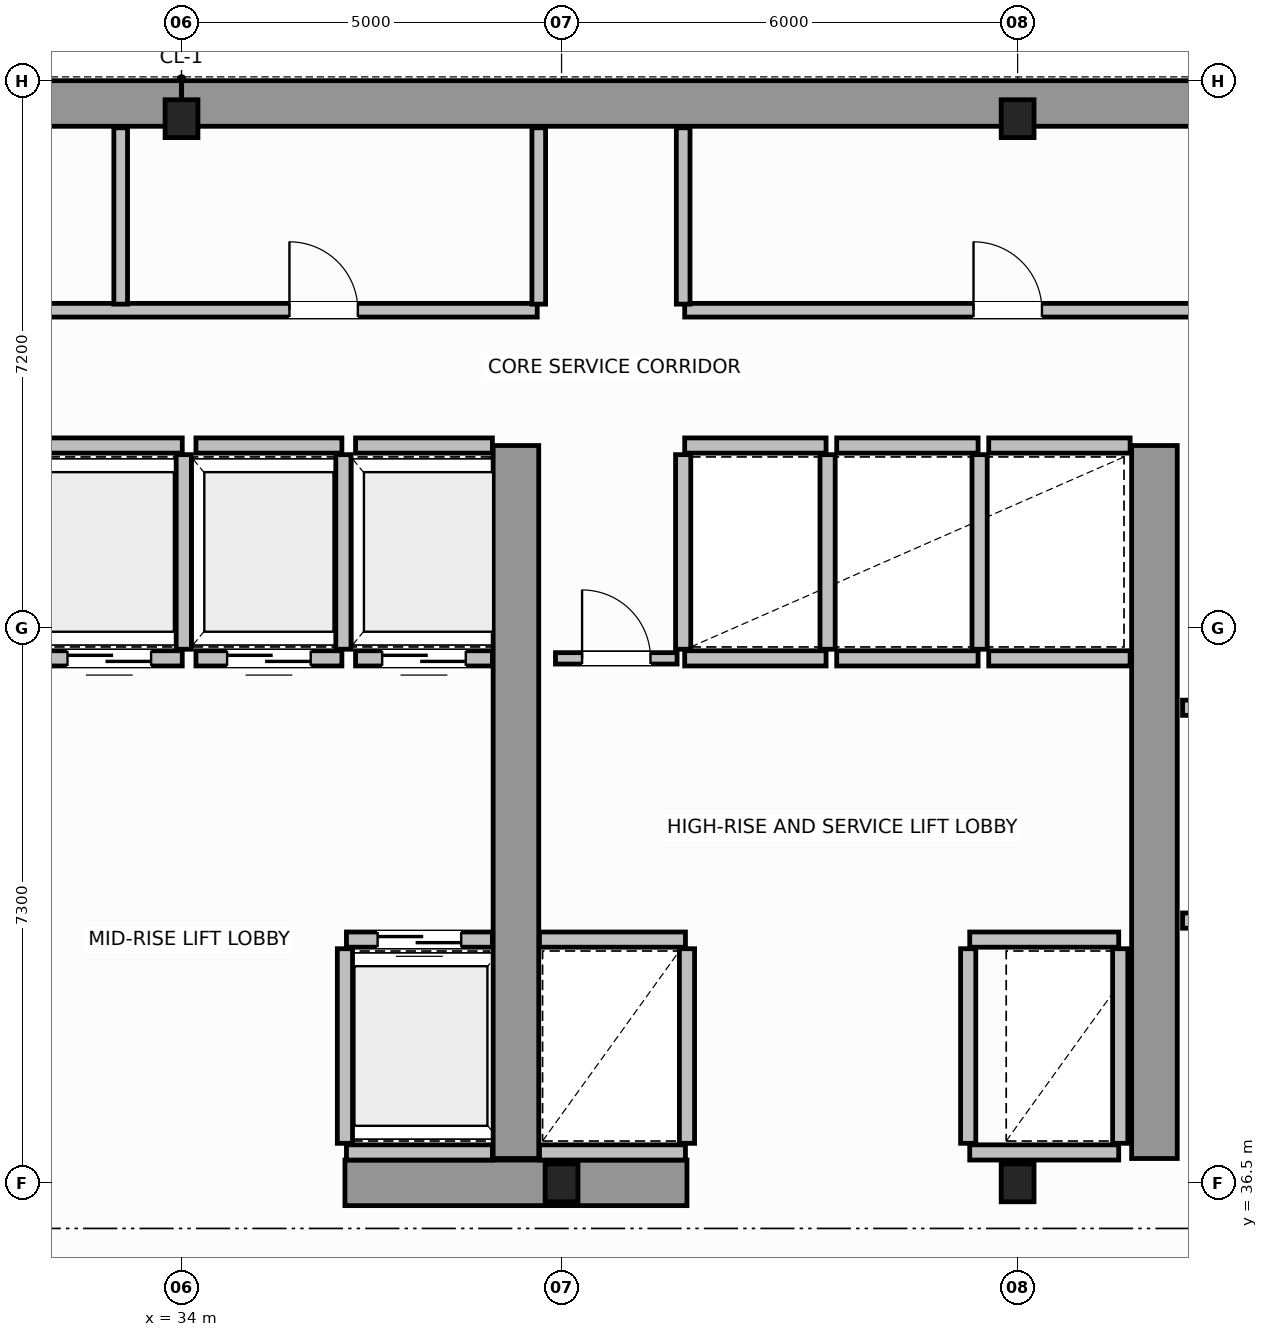
"""IFC4 building model, lengths in metres.
Left out: names, types, materials, properties, quantities, classifications, styles, units other than length and angle.
Written with IfcOpenShell. Run it as: python <this file> out.ifc"""

import sys

from ifc_helpers import new_model, si_unit, direction, frame, frame_2d, origin, origin_2d, place, context, subcontext, project, spatial, rectangle, i_section, extrude, source, transform, mapped, element, fill, save


model = new_model("IFC4")
c1 = context("Model", 3, precision=1e-05, world=origin(), true_north=direction((0.0, 1.0)))
c2 = subcontext(c1, "Body", "Model", "MODEL_VIEW")
j1 = project(units=[si_unit("LENGTHUNIT", "METRE"), si_unit("PLANEANGLEUNIT", "RADIAN")], contexts=[c1])
p1 = place(None, origin())
s1 = spatial("IfcSite", under=j1, at=p1, CompositionType="ELEMENT")
p2 = place(p1, origin())
s2 = spatial("IfcBuilding", under=s1, at=p2, CompositionType="ELEMENT")
p3 = place(p2, frame((0.0, 0.0, 195.6)))
s3 = spatial("IfcBuildingStorey", under=s2, at=p3, CompositionType="ELEMENT", Elevation=195.6)
m1 = source(origin(), c2, "Body", "SweptSolid", [
    extrude(i_section(OverallWidth=0.432, OverallDepth=0.498, WebThickness=0.055, FlangeThickness=0.068, FilletRadius=0.015, at=origin_2d()), origin(), (0.0, 0.0, 1.0), 3.8),
])
for number, where, z_axis, x_axis in (
    (1, (39.0, 36.5, 0.0), (0.0, 0.0, 1.0), (1.0, 0.0, 0.0)),
    (2, (45.0, 36.5, 0.0), (0.0, 0.0, 1.0), (1.0, 0.0, 0.0)),
    (3, (34.0, 50.5, 0.0), (0.0, 0.0, 1.0), (1.0, 0.0, 0.0)),
    (4, (45.0, 50.5, 0.0), (0.0, 0.0, 1.0), (1.0, 0.0, 0.0)),
):
    element("IfcColumn", number, at=place(p3, frame(where, z_axis=z_axis, x_axis=x_axis)), inside=s3, PredefinedType="COLUMN", context=c2, shape_type="MappedRepresentation", body=[
        mapped(m1, transform((0.0, 0.0, 0.0), scale=1.0)),
    ])
for number, where, z_axis, x_axis in (
    (5, (14.304, 50.7, 0.0), (0.0, 0.0, 1.0), (1.0, 0.0, 0.0)),
    (6, (34.002, 50.7, 0.0), (0.0, 0.0, 1.0), (1.0, 0.0, 0.0)),
):
    element("IfcWall", number, at=place(p3, frame(where, z_axis=z_axis, x_axis=x_axis)), inside=s3, PredefinedType="SHEAR", context=c2, shape_type="SweptSolid", body=[
        extrude(rectangle(XDim=19.694, YDim=0.6, at=frame_2d((9.847, 0.0))), origin(), (0.0, 0.0, 1.0), 3.8),
    ])
p4 = place(p3, frame((36.15, 36.5, 0.0), z_axis=(0.0, 0.0, 1.0), x_axis=(1.0, 0.0, 0.0)))
e7 = element("IfcWall", 7, at=p4, inside=s3, PredefinedType="SHEAR", context=c2, shape_type="SweptSolid", body=[
    extrude(rectangle(XDim=4.5, YDim=0.6, at=frame_2d((2.25, 0.0))), origin(), (0.0, 0.0, 1.0), 3.8),
])
for number, where, z_axis, x_axis in (
    (8, (38.4, 36.82, 0.0), (0.0, 0.0, 1.0), (0.0, 1.0, 0.0)),
    (9, (46.8, 36.82, 0.0), (0.0, 0.0, 1.0), (0.0, 1.0, 0.0)),
):
    element("IfcWall", number, at=place(p3, frame(where, z_axis=z_axis, x_axis=x_axis)), inside=s3, PredefinedType="SHEAR", context=c2, shape_type="SweptSolid", body=[
        extrude(rectangle(XDim=9.38, YDim=0.6, at=frame_2d((4.69, 0.0))), origin(), (0.0, 0.0, 1.0), 3.8),
    ])
p5 = place(p3, frame((36.17, 39.7, 0.0), z_axis=(0.0, 0.0, 1.0), x_axis=(1.0, 0.0, 0.0)))
e10 = element("IfcWall", 10, at=p5, inside=s3, PredefinedType="SOLIDWALL", context=c2, shape_type="SweptSolid", body=[
    extrude(rectangle(XDim=1.92, YDim=0.2, at=frame_2d((0.96, 0.0))), origin(), (0.0, 0.0, 1.0), 3.58),
])
p6 = place(p5, frame((0.41, 0.0, 0.0)))
e11 = element("IfcOpeningElement", 11, at=p6, cuts=e10, PredefinedType="OPENING", context=c2, shape_type="SweptSolid", body=[
    extrude(rectangle(XDim=1.1, YDim=2.15, at=frame_2d((0.55, 1.075))), frame((0.0, 0.11, 0.0), z_axis=(0.0, -1.0, 0.0), x_axis=(1.0, 0.0, 0.0)), (0.0, 0.0, 1.0), 0.22),
])
p7 = place(p3, frame((36.17, 36.9, 0.0), z_axis=(0.0, 0.0, 1.0), x_axis=(1.0, 0.0, 0.0)))
e12 = element("IfcWall", 12, at=p7, inside=s3, PredefinedType="SOLIDWALL", context=c2, shape_type="SweptSolid", body=[
    extrude(rectangle(XDim=1.92, YDim=0.2, at=frame_2d((0.96, 0.0))), origin(), (0.0, 0.0, 1.0), 3.58),
])
p8 = place(p3, frame((36.15, 37.02, 0.0), z_axis=(0.0, 0.0, 1.0), x_axis=(0.0, 1.0, 0.0)))
e13 = element("IfcWall", 13, at=p8, inside=s3, PredefinedType="SOLIDWALL", context=c2, shape_type="SweptSolid", body=[
    extrude(rectangle(XDim=2.56, YDim=0.2, at=frame_2d((1.28, 0.0))), origin(), (0.0, 0.0, 1.0), 3.58),
])
p9 = place(p3, frame((32.09, 43.4, 0.0), z_axis=(0.0, 0.0, 1.0), x_axis=(1.0, 0.0, 0.0)))
e14 = element("IfcWall", 14, at=p9, inside=s3, PredefinedType="SOLIDWALL", context=c2, shape_type="SweptSolid", body=[
    extrude(rectangle(XDim=1.92, YDim=0.2, at=frame_2d((0.96, 0.0))), origin(), (0.0, 0.0, 1.0), 3.58),
])
p10 = place(p9, frame((0.41, 0.0, 0.0)))
e15 = element("IfcOpeningElement", 15, at=p10, cuts=e14, PredefinedType="OPENING", context=c2, shape_type="SweptSolid", body=[
    extrude(rectangle(XDim=1.1, YDim=2.15, at=frame_2d((0.55, 1.075))), frame((0.0, 0.11, 0.0), z_axis=(0.0, -1.0, 0.0), x_axis=(1.0, 0.0, 0.0)), (0.0, 0.0, 1.0), 0.22),
])
p11 = place(p3, frame((32.09, 46.2, 0.0), z_axis=(0.0, 0.0, 1.0), x_axis=(1.0, 0.0, 0.0)))
e16 = element("IfcWall", 16, at=p11, inside=s3, PredefinedType="SOLIDWALL", context=c2, shape_type="SweptSolid", body=[
    extrude(rectangle(XDim=1.92, YDim=0.2, at=frame_2d((0.96, 0.0))), origin(), (0.0, 0.0, 1.0), 3.58),
])
p12 = place(p3, frame((34.03, 43.52, 0.0), z_axis=(0.0, 0.0, 1.0), x_axis=(0.0, 1.0, 0.0)))
e17 = element("IfcWall", 17, at=p12, inside=s3, PredefinedType="SOLIDWALL", context=c2, shape_type="SweptSolid", body=[
    extrude(rectangle(XDim=2.56, YDim=0.2, at=frame_2d((1.28, 0.0))), origin(), (0.0, 0.0, 1.0), 3.58),
])
p13 = place(p3, frame((34.19, 43.4, 0.0), z_axis=(0.0, 0.0, 1.0), x_axis=(1.0, 0.0, 0.0)))
e18 = element("IfcWall", 18, at=p13, inside=s3, PredefinedType="SOLIDWALL", context=c2, shape_type="SweptSolid", body=[
    extrude(rectangle(XDim=1.92, YDim=0.2, at=frame_2d((0.96, 0.0))), origin(), (0.0, 0.0, 1.0), 3.58),
])
p14 = place(p13, frame((0.41, 0.0, 0.0)))
e19 = element("IfcOpeningElement", 19, at=p14, cuts=e18, PredefinedType="OPENING", context=c2, shape_type="SweptSolid", body=[
    extrude(rectangle(XDim=1.1, YDim=2.15, at=frame_2d((0.55, 1.075))), frame((0.0, 0.11, 0.0), z_axis=(0.0, -1.0, 0.0), x_axis=(1.0, 0.0, 0.0)), (0.0, 0.0, 1.0), 0.22),
])
p15 = place(p3, frame((34.19, 46.2, 0.0), z_axis=(0.0, 0.0, 1.0), x_axis=(1.0, 0.0, 0.0)))
e20 = element("IfcWall", 20, at=p15, inside=s3, PredefinedType="SOLIDWALL", context=c2, shape_type="SweptSolid", body=[
    extrude(rectangle(XDim=1.92, YDim=0.2, at=frame_2d((0.96, 0.0))), origin(), (0.0, 0.0, 1.0), 3.58),
])
p16 = place(p3, frame((36.13, 43.52, 0.0), z_axis=(0.0, 0.0, 1.0), x_axis=(0.0, 1.0, 0.0)))
e21 = element("IfcWall", 21, at=p16, inside=s3, PredefinedType="SOLIDWALL", context=c2, shape_type="SweptSolid", body=[
    extrude(rectangle(XDim=2.56, YDim=0.2, at=frame_2d((1.28, 0.0))), origin(), (0.0, 0.0, 1.0), 3.58),
])
p17 = place(p3, frame((36.29, 43.4, 0.0), z_axis=(0.0, 0.0, 1.0), x_axis=(1.0, 0.0, 0.0)))
e22 = element("IfcWall", 22, at=p17, inside=s3, PredefinedType="SOLIDWALL", context=c2, shape_type="SweptSolid", body=[
    extrude(rectangle(XDim=1.8, YDim=0.2, at=frame_2d((0.9, 0.0))), origin(), (0.0, 0.0, 1.0), 3.58),
])
p18 = place(p17, frame((0.35, 0.0, 0.0)))
e23 = element("IfcOpeningElement", 23, at=p18, cuts=e22, PredefinedType="OPENING", context=c2, shape_type="SweptSolid", body=[
    extrude(rectangle(XDim=1.1, YDim=2.15, at=frame_2d((0.55, 1.075))), frame((0.0, 0.11, 0.0), z_axis=(0.0, -1.0, 0.0), x_axis=(1.0, 0.0, 0.0)), (0.0, 0.0, 1.0), 0.22),
])
p19 = place(p3, frame((36.29, 46.2, 0.0), z_axis=(0.0, 0.0, 1.0), x_axis=(1.0, 0.0, 0.0)))
e24 = element("IfcWall", 24, at=p19, inside=s3, PredefinedType="SOLIDWALL", context=c2, shape_type="SweptSolid", body=[
    extrude(rectangle(XDim=1.8, YDim=0.2, at=frame_2d((0.9, 0.0))), origin(), (0.0, 0.0, 1.0), 3.58),
])
for number, where, z_axis, x_axis in (
    (25, (38.71, 39.7, 0.0), (0.0, 0.0, 1.0), (1.0, 0.0, 0.0)),
    (26, (38.71, 36.9, 0.0), (0.0, 0.0, 1.0), (1.0, 0.0, 0.0)),
):
    element("IfcWall", number, at=place(p3, frame(where, z_axis=z_axis, x_axis=x_axis)), inside=s3, PredefinedType="SOLIDWALL", context=c2, shape_type="SweptSolid", body=[
        extrude(rectangle(XDim=1.92, YDim=0.2, at=frame_2d((0.96, 0.0))), origin(), (0.0, 0.0, 1.0), 3.58),
    ])
p20 = place(p3, frame((40.65, 37.02, 0.0), z_axis=(0.0, 0.0, 1.0), x_axis=(0.0, 1.0, 0.0)))
e27 = element("IfcWall", 27, at=p20, inside=s3, PredefinedType="SOLIDWALL", context=c2, shape_type="SweptSolid", body=[
    extrude(rectangle(XDim=2.56, YDim=0.2, at=frame_2d((1.28, 0.0))), origin(), (0.0, 0.0, 1.0), 3.58),
])
p21 = place(p3, frame((44.37, 39.7, 0.0), z_axis=(0.0, 0.0, 1.0), x_axis=(1.0, 0.0, 0.0)))
e28 = element("IfcWall", 28, at=p21, inside=s3, PredefinedType="SOLIDWALL", context=c2, shape_type="SweptSolid", body=[
    extrude(rectangle(XDim=1.96, YDim=0.2, at=frame_2d((0.98, 0.0))), origin(), (0.0, 0.0, 1.0), 3.58),
])
p22 = place(p3, frame((44.37, 36.9, 0.0), z_axis=(0.0, 0.0, 1.0), x_axis=(1.0, 0.0, 0.0)))
e29 = element("IfcWall", 29, at=p22, inside=s3, PredefinedType="SOLIDWALL", context=c2, shape_type="SweptSolid", body=[
    extrude(rectangle(XDim=1.96, YDim=0.2, at=frame_2d((0.98, 0.0))), origin(), (0.0, 0.0, 1.0), 2.57),
])
for number, where, z_axis, x_axis in (
    (30, (44.35, 37.02, 0.0), (0.0, 0.0, 1.0), (0.0, 1.0, 0.0)),
    (31, (46.35, 37.02, 0.0), (0.0, 0.0, 1.0), (0.0, 1.0, 0.0)),
):
    element("IfcWall", number, at=place(p3, frame(where, z_axis=z_axis, x_axis=x_axis)), inside=s3, PredefinedType="SOLIDWALL", context=c2, shape_type="SweptSolid", body=[
        extrude(rectangle(XDim=2.56, YDim=0.2, at=frame_2d((1.28, 0.0))), origin(), (0.0, 0.0, 1.0), 3.58),
    ])
for number, where, z_axis, x_axis in (
    (32, (40.62, 43.4, 0.0), (0.0, 0.0, 1.0), (1.0, 0.0, 0.0)),
    (33, (40.62, 46.2, 0.0), (0.0, 0.0, 1.0), (1.0, 0.0, 0.0)),
):
    element("IfcWall", number, at=place(p3, frame(where, z_axis=z_axis, x_axis=x_axis)), inside=s3, PredefinedType="SOLIDWALL", context=c2, shape_type="SweptSolid", body=[
        extrude(rectangle(XDim=1.86, YDim=0.2, at=frame_2d((0.93, 0.0))), origin(), (0.0, 0.0, 1.0), 3.58),
    ])
for number, where, z_axis, x_axis in (
    (34, (40.6, 43.52, 0.0), (0.0, 0.0, 1.0), (0.0, 1.0, 0.0)),
    (35, (42.5, 43.52, 0.0), (0.0, 0.0, 1.0), (0.0, 1.0, 0.0)),
):
    element("IfcWall", number, at=place(p3, frame(where, z_axis=z_axis, x_axis=x_axis)), inside=s3, PredefinedType="SOLIDWALL", context=c2, shape_type="SweptSolid", body=[
        extrude(rectangle(XDim=2.56, YDim=0.2, at=frame_2d((1.28, 0.0))), origin(), (0.0, 0.0, 1.0), 3.58),
    ])
for number, where, z_axis, x_axis in (
    (36, (42.62, 43.4, 0.0), (0.0, 0.0, 1.0), (1.0, 0.0, 0.0)),
    (37, (42.62, 46.2, 0.0), (0.0, 0.0, 1.0), (1.0, 0.0, 0.0)),
):
    element("IfcWall", number, at=place(p3, frame(where, z_axis=z_axis, x_axis=x_axis)), inside=s3, PredefinedType="SOLIDWALL", context=c2, shape_type="SweptSolid", body=[
        extrude(rectangle(XDim=1.86, YDim=0.2, at=frame_2d((0.93, 0.0))), origin(), (0.0, 0.0, 1.0), 3.58),
    ])
p23 = place(p3, frame((44.5, 43.52, 0.0), z_axis=(0.0, 0.0, 1.0), x_axis=(0.0, 1.0, 0.0)))
e38 = element("IfcWall", 38, at=p23, inside=s3, PredefinedType="SOLIDWALL", context=c2, shape_type="SweptSolid", body=[
    extrude(rectangle(XDim=2.56, YDim=0.2, at=frame_2d((1.28, 0.0))), origin(), (0.0, 0.0, 1.0), 3.58),
])
for number, where, z_axis, x_axis in (
    (39, (44.62, 43.4, 0.0), (0.0, 0.0, 1.0), (1.0, 0.0, 0.0)),
    (40, (44.62, 46.2, 0.0), (0.0, 0.0, 1.0), (1.0, 0.0, 0.0)),
):
    element("IfcWall", number, at=place(p3, frame(where, z_axis=z_axis, x_axis=x_axis)), inside=s3, PredefinedType="SOLIDWALL", context=c2, shape_type="SweptSolid", body=[
        extrude(rectangle(XDim=1.86, YDim=0.2, at=frame_2d((0.93, 0.0))), origin(), (0.0, 0.0, 1.0), 3.58),
    ])
p24 = place(p3, frame((47.17, 39.95, 0.0), z_axis=(0.0, 0.0, 1.0), x_axis=(1.0, 0.0, 0.0)))
e41 = element("IfcWall", 41, at=p24, inside=s3, PredefinedType="SOLIDWALL", context=c2, shape_type="SweptSolid", body=[
    extrude(rectangle(XDim=2.16, YDim=0.2, at=frame_2d((1.08, 0.0))), origin(), (0.0, 0.0, 1.0), 3.58),
])
p25 = place(p24, frame((0.53, 0.0, 0.0)))
e42 = element("IfcOpeningElement", 42, at=p25, cuts=e41, PredefinedType="OPENING", context=c2, shape_type="SweptSolid", body=[
    extrude(rectangle(XDim=1.1, YDim=2.15, at=frame_2d((0.55, 1.075))), frame((0.0, 0.11, 0.0), z_axis=(0.0, -1.0, 0.0), x_axis=(1.0, 0.0, 0.0)), (0.0, 0.0, 1.0), 0.22),
])
p26 = place(p3, frame((47.17, 42.75, 0.0), z_axis=(0.0, 0.0, 1.0), x_axis=(1.0, 0.0, 0.0)))
e43 = element("IfcWall", 43, at=p26, inside=s3, PredefinedType="SOLIDWALL", context=c2, shape_type="SweptSolid", body=[
    extrude(rectangle(XDim=2.16, YDim=0.2, at=frame_2d((1.08, 0.0))), origin(), (0.0, 0.0, 1.0), 3.58),
])
p27 = place(p3, frame((38.92, 43.4, 0.0), z_axis=(0.0, 0.0, 1.0), x_axis=(1.0, 0.0, 0.0)))
e44 = element("IfcWall", 44, at=p27, inside=s3, PredefinedType="PARTITIONING", context=c2, shape_type="SweptSolid", body=[
    extrude(rectangle(XDim=1.6, YDim=0.15, at=frame_2d((0.8, 0.0))), origin(), (0.0, 0.0, 1.0), 3.58),
])
p28 = place(p27, frame((0.35, 0.0, 0.0)))
e45 = element("IfcOpeningElement", 45, at=p28, cuts=e44, PredefinedType="OPENING", context=c2, shape_type="SweptSolid", body=[
    extrude(rectangle(XDim=0.9, YDim=2.1, at=frame_2d((0.45, 1.05))), frame((0.0, 0.085, 0.0), z_axis=(0.0, -1.0, 0.0), x_axis=(1.0, 0.0, 0.0)), (0.0, 0.0, 1.0), 0.17),
])
p29 = place(p3, frame((18.62, 47.98, 0.0), z_axis=(0.0, 0.0, 1.0), x_axis=(1.0, 0.0, 0.0)))
e46 = element("IfcWall", 46, at=p29, inside=s3, PredefinedType="PLUMBINGWALL", context=c2, shape_type="SweptSolid", body=[
    extrude(rectangle(XDim=20.06, YDim=0.18, at=frame_2d((10.03, 0.0))), origin(), (0.0, 0.0, 1.0), 3.58),
])
p30 = place(p29, frame((3.5, 0.0, 0.0)))
e47 = element("IfcOpeningElement", 47, at=p30, cuts=e46, PredefinedType="OPENING", context=c2, shape_type="SweptSolid", body=[
    extrude(rectangle(XDim=0.9, YDim=2.15, at=frame_2d((0.45, 1.075))), frame((0.0, 0.1, 0.0), z_axis=(0.0, -1.0, 0.0), x_axis=(1.0, 0.0, 0.0)), (0.0, 0.0, 1.0), 0.2),
])
p31 = place(p29, frame((10.8, 0.0, 0.0)))
e48 = element("IfcOpeningElement", 48, at=p31, cuts=e46, PredefinedType="OPENING", context=c2, shape_type="SweptSolid", body=[
    extrude(rectangle(XDim=0.9, YDim=2.15, at=frame_2d((0.45, 1.075))), frame((0.0, 0.1, 0.0), z_axis=(0.0, -1.0, 0.0), x_axis=(1.0, 0.0, 0.0)), (0.0, 0.0, 1.0), 0.2),
])
p32 = place(p29, frame((16.8, 0.0, 0.0)))
e49 = element("IfcOpeningElement", 49, at=p32, cuts=e46, PredefinedType="OPENING", context=c2, shape_type="SweptSolid", body=[
    extrude(rectangle(XDim=0.9, YDim=2.15, at=frame_2d((0.45, 1.075))), frame((0.0, 0.1, 0.0), z_axis=(0.0, -1.0, 0.0), x_axis=(1.0, 0.0, 0.0)), (0.0, 0.0, 1.0), 0.2),
])
p33 = place(p3, frame((40.62, 47.98, 0.0), z_axis=(0.0, 0.0, 1.0), x_axis=(1.0, 0.0, 0.0)))
e50 = element("IfcWall", 50, at=p33, inside=s3, PredefinedType="PLUMBINGWALL", context=c2, shape_type="SweptSolid", body=[
    extrude(rectangle(XDim=8.76, YDim=0.18, at=frame_2d((4.38, 0.0))), origin(), (0.0, 0.0, 1.0), 3.58),
])
p34 = place(p33, frame((3.8, 0.0, 0.0)))
e51 = element("IfcOpeningElement", 51, at=p34, cuts=e50, PredefinedType="OPENING", context=c2, shape_type="SweptSolid", body=[
    extrude(rectangle(XDim=0.9, YDim=2.15, at=frame_2d((0.45, 1.075))), frame((0.0, 0.1, 0.0), z_axis=(0.0, -1.0, 0.0), x_axis=(1.0, 0.0, 0.0)), (0.0, 0.0, 1.0), 0.2),
])
for number, where, z_axis, x_axis in (
    (52, (33.2, 48.06, 0.0), (0.0, 0.0, 1.0), (0.0, 1.0, 0.0)),
    (53, (38.7, 48.06, 0.0), (0.0, 0.0, 1.0), (0.0, 1.0, 0.0)),
    (54, (40.6, 48.06, 0.0), (0.0, 0.0, 1.0), (0.0, 1.0, 0.0)),
):
    element("IfcWall", number, at=place(p3, frame(where, z_axis=z_axis, x_axis=x_axis)), inside=s3, PredefinedType="PLUMBINGWALL", context=c2, shape_type="SweptSolid", body=[
        extrude(rectangle(XDim=2.32, YDim=0.18, at=frame_2d((1.16, 0.0))), origin(), (0.0, 0.0, 1.0), 3.58),
    ])
m2 = source(origin(), c2, "Body", "SweptSolid", [
    extrude(rectangle(XDim=1.1, YDim=2.15, at=frame_2d((0.55, 1.075))), frame((0.0, 0.025, 0.0), z_axis=(0.0, -1.0, 0.0), x_axis=(1.0, 0.0, 0.0)), (0.0, 0.0, 1.0), 0.05),
])
p35 = place(p6, origin())
e55 = element("IfcDoor", 55, at=p35, inside=s3, OperationType="DOUBLE_DOOR_SLIDING", PredefinedType="DOOR", context=c2, shape_type="MappedRepresentation", body=[
    mapped(m2, transform((0.0, 0.0, 0.0), scale=1.0)),
])
fill(e11, e55)
p36 = place(p10, origin())
e56 = element("IfcDoor", 56, at=p36, inside=s3, OperationType="DOUBLE_DOOR_SLIDING", PredefinedType="DOOR", context=c2, shape_type="MappedRepresentation", body=[
    mapped(m2, transform((0.0, 0.0, 0.0), scale=1.0)),
])
fill(e15, e56)
p37 = place(p14, origin())
e57 = element("IfcDoor", 57, at=p37, inside=s3, OperationType="DOUBLE_DOOR_SLIDING", PredefinedType="DOOR", context=c2, shape_type="MappedRepresentation", body=[
    mapped(m2, transform((0.0, 0.0, 0.0), scale=1.0)),
])
fill(e19, e57)
p38 = place(p18, origin())
e58 = element("IfcDoor", 58, at=p38, inside=s3, OperationType="DOUBLE_DOOR_SLIDING", PredefinedType="DOOR", context=c2, shape_type="MappedRepresentation", body=[
    mapped(m2, transform((0.0, 0.0, 0.0), scale=1.0)),
])
fill(e23, e58)
m3 = source(origin(), c2, "Body", "SweptSolid", [
    extrude(rectangle(XDim=0.9, YDim=2.1, at=frame_2d((0.45, 1.05))), frame((0.0, 0.025, 0.0), z_axis=(0.0, -1.0, 0.0), x_axis=(1.0, 0.0, 0.0)), (0.0, 0.0, 1.0), 0.05),
])
p39 = place(p28, origin())
e59 = element("IfcDoor", 59, at=p39, inside=s3, OperationType="SINGLE_SWING_LEFT", PredefinedType="DOOR", context=c2, shape_type="MappedRepresentation", body=[
    mapped(m3, transform((0.0, 0.0, 0.0), scale=1.0)),
])
fill(e45, e59)
m4 = source(origin(), c2, "Body", "SweptSolid", [
    extrude(rectangle(XDim=0.9, YDim=2.15, at=frame_2d((0.45, 1.075))), frame((0.0, 0.025, 0.0), z_axis=(0.0, -1.0, 0.0), x_axis=(1.0, 0.0, 0.0)), (0.0, 0.0, 1.0), 0.05),
])
p40 = place(p32, origin())
e60 = element("IfcDoor", 60, at=p40, inside=s3, OperationType="SINGLE_SWING_LEFT", PredefinedType="DOOR", context=c2, shape_type="MappedRepresentation", body=[
    mapped(m4, transform((0.0, 0.0, 0.0), scale=1.0)),
])
fill(e49, e60)
p41 = place(p34, origin())
e61 = element("IfcDoor", 61, at=p41, inside=s3, OperationType="SINGLE_SWING_RIGHT", PredefinedType="DOOR", context=c2, shape_type="MappedRepresentation", body=[
    mapped(m4, transform((0.0, 0.0, 0.0), scale=1.0)),
])
fill(e51, e61)
save(model, sys.argv[1])
